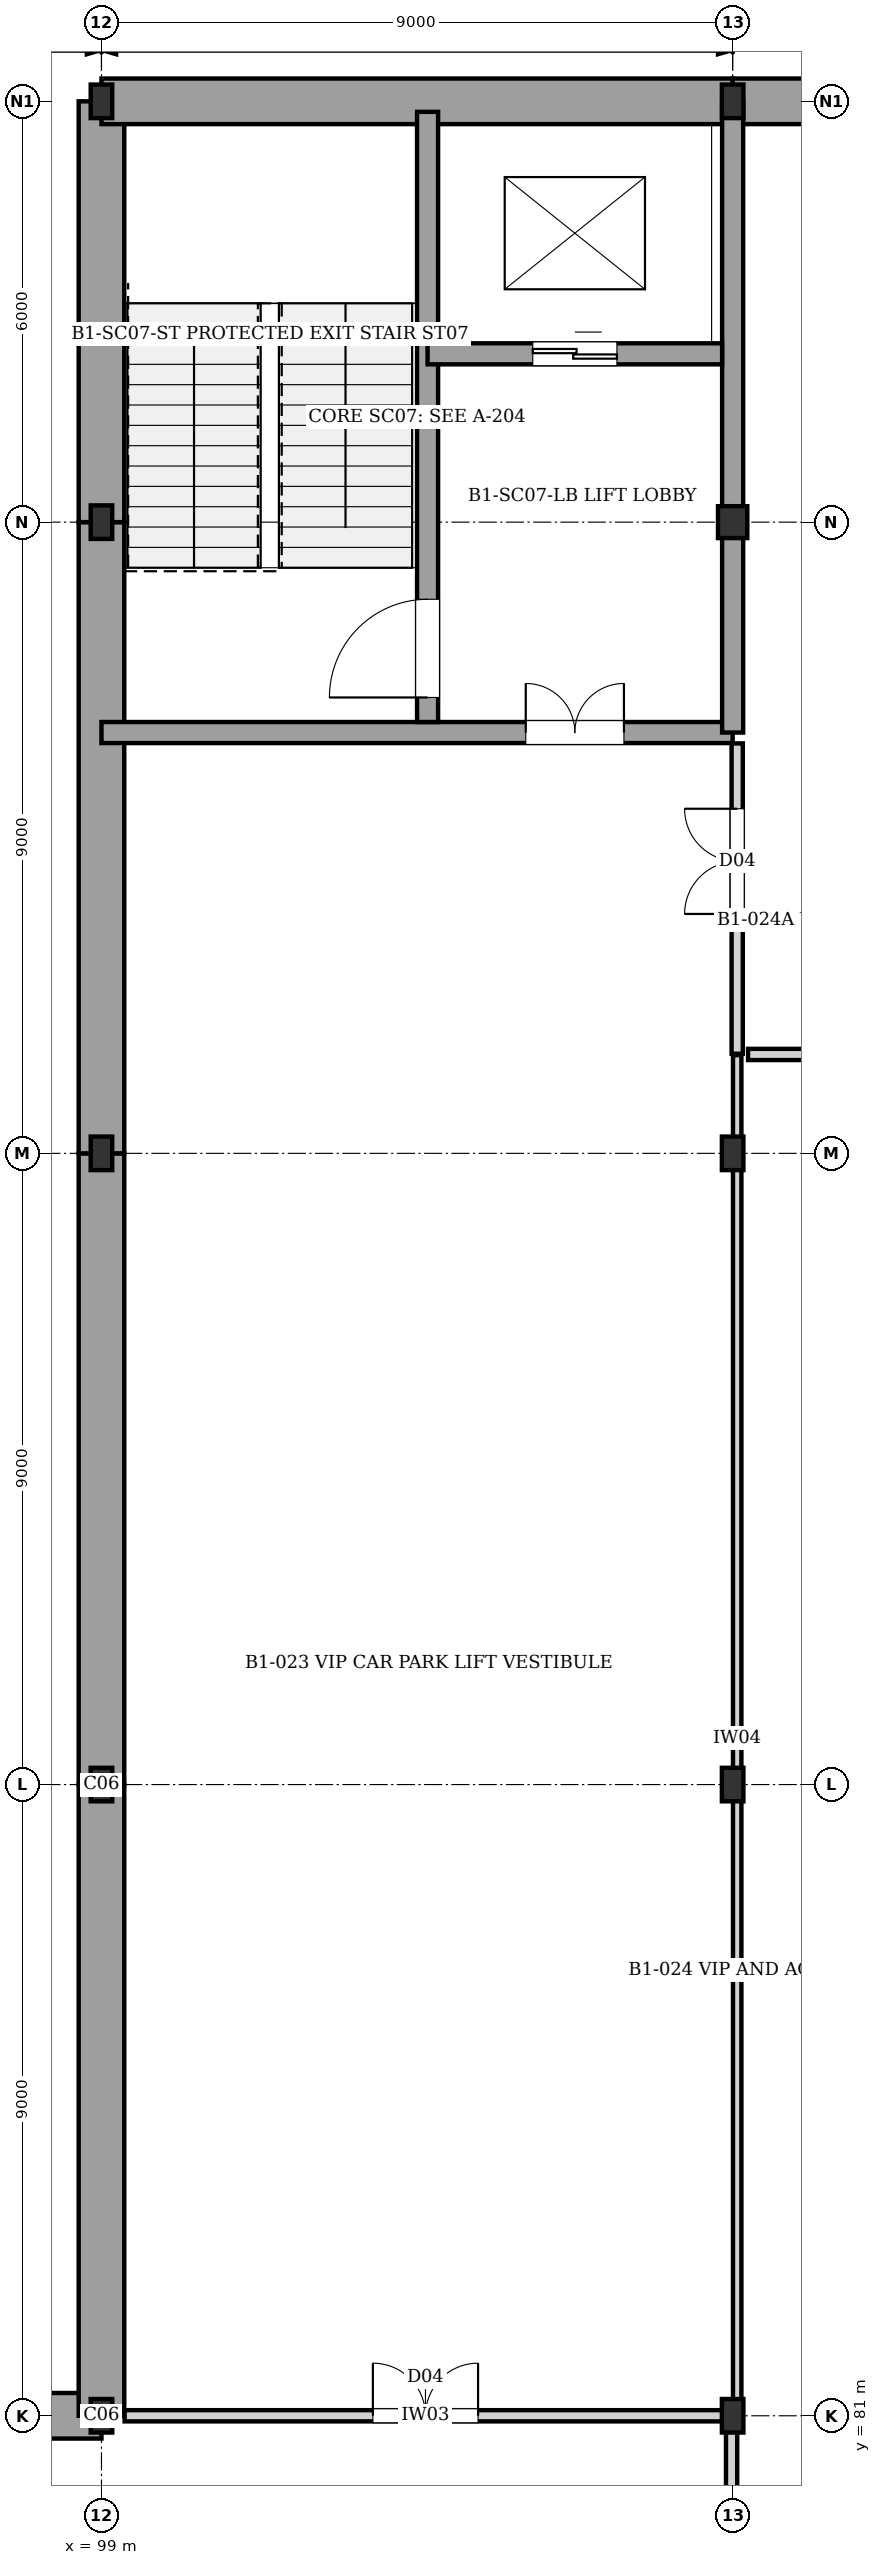
"""IFC4 building model, lengths in metres.
Left out: names, types, materials, properties, quantities, classifications, styles, units other than length and angle.
Written with IfcOpenShell. Run it as: python <this file> out.ifc"""

import sys

from ifc_helpers import new_model, si_unit, direction, frame, frame_2d, origin, origin_2d, place, context, subcontext, project, spatial, rectangle, i_section, extrude, element, fill, save


model = new_model("IFC4")
c1 = context("Model", 3, precision=1e-05, world=origin(), true_north=direction((0.0, 1.0)))
c2 = subcontext(c1, "Body", "Model", "MODEL_VIEW")
j1 = project(units=[si_unit("LENGTHUNIT", "METRE"), si_unit("PLANEANGLEUNIT", "RADIAN")], contexts=[c1])
p1 = place(None, origin())
s1 = spatial("IfcSite", under=j1, at=p1, CompositionType="ELEMENT")
p2 = place(p1, origin())
s2 = spatial("IfcBuilding", under=s1, at=p2, CompositionType="ELEMENT")
p3 = place(p2, frame((0.0, 0.0, -4.48)))
s3 = spatial("IfcBuildingStorey", under=s2, at=p3, CompositionType="ELEMENT", Elevation=-4.48)
for number, where, z_axis, x_axis in (
    (1, (99.0, 81.0, 0.0), (0.0, 0.0, 1.0), (1.0, 0.0, 0.0)),
    (2, (99.0, 90.0, 0.0), (0.0, 0.0, 1.0), (1.0, 0.0, 0.0)),
    (3, (99.0, 99.0, 0.0), (0.0, 0.0, 1.0), (1.0, 0.0, 0.0)),
    (4, (99.0, 108.0, 0.0), (0.0, 0.0, 1.0), (1.0, 0.0, 0.0)),
    (5, (99.0, 114.0, 0.0), (0.0, 0.0, 1.0), (1.0, 0.0, 0.0)),
    (6, (108.0, 81.0, 0.0), (0.0, 0.0, 1.0), (1.0, 0.0, 0.0)),
    (7, (108.0, 90.0, 0.0), (0.0, 0.0, 1.0), (1.0, 0.0, 0.0)),
    (8, (108.0, 99.0, 0.0), (0.0, 0.0, 1.0), (1.0, 0.0, 0.0)),
):
    element("IfcColumn", number, at=place(p3, frame(where, z_axis=z_axis, x_axis=x_axis)), inside=s3, PredefinedType="COLUMN", context=c2, shape_type="SweptSolid", body=[
        extrude(i_section(OverallWidth=0.307, OverallDepth=0.478, WebThickness=0.021, FlangeThickness=0.04, at=origin_2d()), origin(), (0.0, 0.0, 1.0), 4.48),
    ])
p4 = place(p3, frame((108.0, 108.0, 0.0), z_axis=(0.0, 0.0, 1.0), x_axis=(1.0, 0.0, 0.0)))
e9 = element("IfcColumn", 9, at=p4, inside=s3, PredefinedType="COLUMN", context=c2, shape_type="SweptSolid", body=[
    extrude(i_section(OverallWidth=0.418, OverallDepth=0.455, WebThickness=0.032, FlangeThickness=0.056, at=origin_2d()), origin(), (0.0, 0.0, 1.0), 4.48),
])
p5 = place(p3, frame((108.0, 114.0, 0.0), z_axis=(0.0, 0.0, 1.0), x_axis=(1.0, 0.0, 0.0)))
e10 = element("IfcColumn", 10, at=p5, inside=s3, PredefinedType="COLUMN", context=c2, shape_type="SweptSolid", body=[
    extrude(i_section(OverallWidth=0.307, OverallDepth=0.478, WebThickness=0.021, FlangeThickness=0.04, at=origin_2d()), origin(), (0.0, 0.0, 1.0), 4.48),
])
p6 = place(p3, frame((90.0, 81.0, 0.0), z_axis=(0.0, 0.0, 1.0), x_axis=(1.0, 0.0, 0.0)))
e11 = element("IfcWall", 11, at=p6, inside=s3, PredefinedType="USERDEFINED", context=c2, shape_type="SweptSolid", body=[
    extrude(rectangle(XDim=9.0, YDim=0.65, at=frame_2d((4.5, 0.0))), origin(), (0.0, 0.0, 1.0), 4.03),
])
for number, where, z_axis, x_axis in (
    (12, (99.0, 81.0, 0.0), (0.0, 0.0, 1.0), (0.0, 1.0, 0.0)),
    (13, (99.0, 90.0, 0.0), (0.0, 0.0, 1.0), (0.0, 1.0, 0.0)),
    (14, (99.0, 99.0, 0.0), (0.0, 0.0, 1.0), (0.0, 1.0, 0.0)),
):
    element("IfcWall", number, at=place(p3, frame(where, z_axis=z_axis, x_axis=x_axis)), inside=s3, PredefinedType="USERDEFINED", context=c2, shape_type="SweptSolid", body=[
        extrude(rectangle(XDim=9.0, YDim=0.65, at=frame_2d((4.5, 0.0))), origin(), (0.0, 0.0, 1.0), 4.14),
    ])
p7 = place(p3, frame((99.0, 108.0, 0.0), z_axis=(0.0, 0.0, 1.0), x_axis=(0.0, 1.0, 0.0)))
e15 = element("IfcWall", 15, at=p7, inside=s3, PredefinedType="USERDEFINED", context=c2, shape_type="SweptSolid", body=[
    extrude(rectangle(XDim=6.0, YDim=0.65, at=frame_2d((3.0, 0.0))), origin(), (0.0, 0.0, 1.0), 4.14),
])
for number, where, z_axis, x_axis in (
    (16, (99.0, 114.0, 0.0), (0.0, 0.0, 1.0), (1.0, 0.0, 0.0)),
    (17, (108.0, 114.0, 0.0), (0.0, 0.0, 1.0), (1.0, 0.0, 0.0)),
):
    element("IfcWall", number, at=place(p3, frame(where, z_axis=z_axis, x_axis=x_axis)), inside=s3, PredefinedType="USERDEFINED", context=c2, shape_type="SweptSolid", body=[
        extrude(rectangle(XDim=9.0, YDim=0.65, at=frame_2d((4.5, 0.0))), origin(), (0.0, 0.0, 1.0), 4.14),
    ])
p8 = place(p3, frame((99.0, 105.0, 0.0), z_axis=(0.0, 0.0, 1.0), x_axis=(1.0, 0.0, 0.0)))
e18 = element("IfcWall", 18, at=p8, inside=s3, PredefinedType="SHEAR", context=c2, shape_type="SweptSolid", body=[
    extrude(rectangle(XDim=9.0, YDim=0.3, at=frame_2d((4.5, 0.0))), origin(), (0.0, 0.0, 1.0), 4.14),
])
p9 = place(p8, frame((6.05, 0.0, 0.0)))
e19 = element("IfcOpeningElement", 19, at=p9, cuts=e18, PredefinedType="OPENING", context=c2, shape_type="SweptSolid", body=[
    extrude(rectangle(XDim=1.4, YDim=2.02, at=frame_2d((0.7, 1.01))), frame((0.0, 0.16, 0.0), z_axis=(0.0, -1.0, 0.0), x_axis=(1.0, 0.0, 0.0)), (0.0, 0.0, 1.0), 0.32),
])
p10 = place(p3, frame((108.0, 105.0, 0.0), z_axis=(0.0, 0.0, 1.0), x_axis=(0.0, 1.0, 0.0)))
e20 = element("IfcWall", 20, at=p10, inside=s3, PredefinedType="SHEAR", context=c2, shape_type="SweptSolid", body=[
    extrude(rectangle(XDim=9.0, YDim=0.3, at=frame_2d((4.5, 0.0))), origin(), (0.0, 0.0, 1.0), 4.14),
])
p11 = place(p3, frame((103.65, 105.15, 0.0), z_axis=(0.0, 0.0, 1.0), x_axis=(0.0, 1.0, 0.0)))
e21 = element("IfcWall", 21, at=p11, inside=s3, PredefinedType="SHEAR", context=c2, shape_type="SweptSolid", body=[
    extrude(rectangle(XDim=8.7, YDim=0.3, at=frame_2d((4.35, 0.0))), origin(), (0.0, 0.0, 1.0), 4.14),
])
p12 = place(p11, frame((0.35, 0.0, 0.0)))
e22 = element("IfcOpeningElement", 22, at=p12, cuts=e21, PredefinedType="OPENING", context=c2, shape_type="SweptSolid", body=[
    extrude(rectangle(XDim=1.4, YDim=2.02, at=frame_2d((0.7, 1.01))), frame((0.0, 0.16, 0.0), z_axis=(0.0, -1.0, 0.0), x_axis=(1.0, 0.0, 0.0)), (0.0, 0.0, 1.0), 0.32),
])
p13 = place(p3, frame((103.65, 110.4, 0.0), z_axis=(0.0, 0.0, 1.0), x_axis=(1.0, 0.0, 0.0)))
e23 = element("IfcWall", 23, at=p13, inside=s3, PredefinedType="SHEAR", context=c2, shape_type="SweptSolid", body=[
    extrude(rectangle(XDim=4.2, YDim=0.3, at=frame_2d((2.1, 0.0))), origin(), (0.0, 0.0, 1.0), 4.14),
])
p14 = place(p13, frame((1.5, 0.0, 0.0)))
e24 = element("IfcOpeningElement", 24, at=p14, cuts=e23, PredefinedType="OPENING", context=c2, shape_type="SweptSolid", body=[
    extrude(rectangle(XDim=1.2, YDim=2.2, at=frame_2d((0.6, 1.1))), frame((0.0, 0.16, 0.0), z_axis=(0.0, -1.0, 0.0), x_axis=(1.0, 0.0, 0.0)), (0.0, 0.0, 1.0), 0.32),
])
p15 = place(p3, frame((107.985, 72.33, 0.0), z_axis=(0.0, 0.0, 1.0), x_axis=(0.0, 1.0, 0.0)))
e25 = element("IfcWall", 25, at=p15, inside=s3, PredefinedType="PARTITIONING", context=c2, shape_type="SweptSolid", body=[
    extrude(rectangle(XDim=8.75, YDim=0.16, at=frame_2d((4.375, 0.0))), origin(), (0.0, 0.0, 1.0), 3.24),
])
p16 = place(p3, frame((108.065, 80.92, 0.0), z_axis=(0.0, 0.0, 1.0), x_axis=(0.0, 1.0, 0.0)))
e26 = element("IfcWall", 26, at=p16, inside=s3, PredefinedType="PARTITIONING", context=c2, shape_type="SweptSolid", body=[
    extrude(rectangle(XDim=19.48, YDim=0.12, at=frame_2d((9.74, 0.0))), origin(), (0.0, 0.0, 1.0), 3.24),
])
p17 = place(p3, frame((99.33, 81.0, 0.0), z_axis=(0.0, 0.0, 1.0), x_axis=(1.0, 0.0, 0.0)))
e27 = element("IfcWall", 27, at=p17, inside=s3, PredefinedType="PARTITIONING", context=c2, shape_type="SweptSolid", body=[
    extrude(rectangle(XDim=8.58, YDim=0.16, at=frame_2d((4.29, 0.0))), origin(), (0.0, 0.0, 1.0), 3.24),
])
p18 = place(p17, frame((3.54, 0.0, 0.0)))
e28 = element("IfcOpeningElement", 28, at=p18, cuts=e27, PredefinedType="OPENING", context=c2, shape_type="SweptSolid", body=[
    extrude(rectangle(XDim=1.5, YDim=2.1, at=frame_2d((0.75, 1.05))), frame((0.0, 0.09, 0.0), z_axis=(0.0, -1.0, 0.0), x_axis=(1.0, 0.0, 0.0)), (0.0, 0.0, 1.0), 0.18),
])
p19 = place(p3, frame((108.065, 100.42, 0.0), z_axis=(0.0, 0.0, 1.0), x_axis=(0.0, 1.0, 0.0)))
e29 = element("IfcWall", 29, at=p19, inside=s3, PredefinedType="PARTITIONING", context=c2, shape_type="SweptSolid", body=[
    extrude(rectangle(XDim=4.425, YDim=0.16, at=frame_2d((2.212, 0.0))), origin(), (0.0, 0.0, 1.0), 3.24),
])
p20 = place(p19, frame((1.993, 0.0, 0.0)))
e30 = element("IfcOpeningElement", 30, at=p20, cuts=e29, PredefinedType="OPENING", context=c2, shape_type="SweptSolid", body=[
    extrude(rectangle(XDim=1.5, YDim=2.1, at=frame_2d((0.75, 1.05))), frame((0.0, 0.09, 0.0), z_axis=(0.0, -1.0, 0.0), x_axis=(1.0, 0.0, 0.0)), (0.0, 0.0, 1.0), 0.18),
])
p21 = place(p3, frame((108.22, 100.41, 0.0), z_axis=(0.0, 0.0, 1.0), x_axis=(1.0, 0.0, 0.0)))
e31 = element("IfcWall", 31, at=p21, inside=s3, PredefinedType="PARTITIONING", context=c2, shape_type="SweptSolid", body=[
    extrude(rectangle(XDim=44.625, YDim=0.16, at=frame_2d((22.312, 0.0))), origin(), (0.0, 0.0, 1.0), 4.14),
])
p22 = place(p21, frame((21.812, 0.0, 0.0)))
e32 = element("IfcOpeningElement", 32, at=p22, cuts=e31, PredefinedType="OPENING", context=c2, shape_type="SweptSolid", body=[
    extrude(rectangle(XDim=1.0, YDim=2.1, at=frame_2d((0.5, 1.05))), frame((0.0, 0.09, 0.0), z_axis=(0.0, -1.0, 0.0), x_axis=(1.0, 0.0, 0.0)), (0.0, 0.0, 1.0), 0.18),
])
p23 = place(p9, origin())
e33 = element("IfcDoor", 33, at=p23, inside=s3, OperationType="DOUBLE_DOOR_SINGLE_SWING", PredefinedType="DOOR", context=c2, shape_type="SweptSolid", body=[
    extrude(rectangle(XDim=1.4, YDim=2.02, at=frame_2d((0.7, 1.01))), frame((0.0, 0.025, 0.0), z_axis=(0.0, -1.0, 0.0), x_axis=(1.0, 0.0, 0.0)), (0.0, 0.0, 1.0), 0.05),
])
fill(e19, e33)
p24 = place(p12, origin())
e34 = element("IfcDoor", 34, at=p24, inside=s3, OperationType="SINGLE_SWING_LEFT", PredefinedType="DOOR", context=c2, shape_type="SweptSolid", body=[
    extrude(rectangle(XDim=1.4, YDim=2.02, at=frame_2d((0.7, 1.01))), frame((0.0, 0.025, 0.0), z_axis=(0.0, -1.0, 0.0), x_axis=(1.0, 0.0, 0.0)), (0.0, 0.0, 1.0), 0.05),
])
fill(e22, e34)
p25 = place(p14, origin())
e35 = element("IfcDoor", 35, at=p25, inside=s3, OperationType="DOUBLE_DOOR_SLIDING", PredefinedType="DOOR", context=c2, shape_type="SweptSolid", body=[
    extrude(rectangle(XDim=1.2, YDim=2.2, at=frame_2d((0.6, 1.1))), frame((0.0, 0.025, 0.0), z_axis=(0.0, -1.0, 0.0), x_axis=(1.0, 0.0, 0.0)), (0.0, 0.0, 1.0), 0.05),
])
fill(e24, e35)
p26 = place(p18, origin())
e36 = element("IfcDoor", 36, at=p26, inside=s3, OperationType="DOUBLE_DOOR_SINGLE_SWING", PredefinedType="DOOR", context=c2, shape_type="SweptSolid", body=[
    extrude(rectangle(XDim=1.5, YDim=2.1, at=frame_2d((0.75, 1.05))), frame((0.0, 0.025, 0.0), z_axis=(0.0, -1.0, 0.0), x_axis=(1.0, 0.0, 0.0)), (0.0, 0.0, 1.0), 0.05),
])
fill(e28, e36)
p27 = place(p20, origin())
e37 = element("IfcDoor", 37, at=p27, inside=s3, OperationType="DOUBLE_DOOR_SINGLE_SWING", PredefinedType="DOOR", context=c2, shape_type="SweptSolid", body=[
    extrude(rectangle(XDim=1.5, YDim=2.1, at=frame_2d((0.75, 1.05))), frame((0.0, 0.025, 0.0), z_axis=(0.0, -1.0, 0.0), x_axis=(1.0, 0.0, 0.0)), (0.0, 0.0, 1.0), 0.05),
])
fill(e30, e37)
save(model, sys.argv[1])
